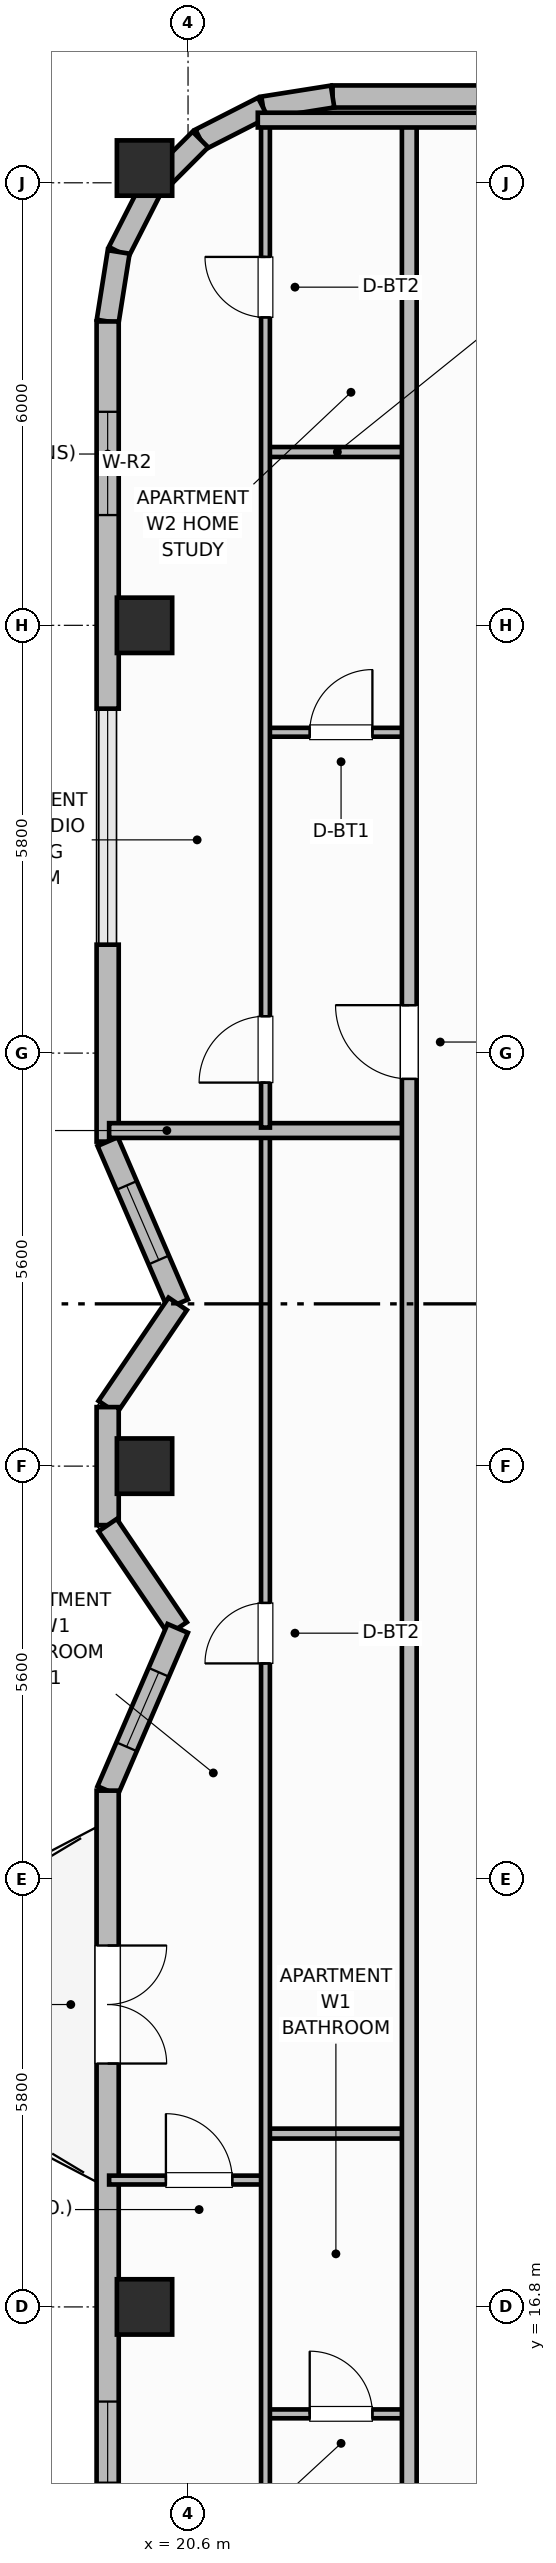
"""IFC4 building model, lengths in metres.
Left out: names, types, materials, properties, quantities, classifications, styles, units other than length and angle.
Written with IfcOpenShell. Run it as: python <this file> out.ifc"""

import sys

from ifc_helpers import new_model, si_unit, direction, frame, frame_2d, origin, origin_2d, place, context, subcontext, project, spatial, rectangle, extrude, element, fill, save


model = new_model("IFC4")
c1 = context("Model", 3, precision=1e-05, world=origin(), true_north=direction((0.0, 1.0)))
c2 = subcontext(c1, "Body", "Model", "MODEL_VIEW")
j1 = project(units=[si_unit("LENGTHUNIT", "METRE"), si_unit("PLANEANGLEUNIT", "RADIAN")], contexts=[c1])
p1 = place(None, origin())
s1 = spatial("IfcSite", under=j1, at=p1, CompositionType="ELEMENT")
p2 = place(p1, origin())
s2 = spatial("IfcBuilding", under=s1, at=p2, CompositionType="ELEMENT")
p3 = place(p2, frame((0.0, 0.0, 289.8)))
s3 = spatial("IfcBuildingStorey", under=s2, at=p3, CompositionType="ELEMENT", Elevation=289.8)
for number, where, z_axis, x_axis in (
    (1, (20.01, 16.8, 0.0), (0.0, 0.0, 1.0), (1.0, 0.0, 0.0)),
    (2, (20.01, 28.2, 0.0), (0.0, 0.0, 1.0), (1.0, 0.0, 0.0)),
    (3, (20.01, 39.6, 0.0), (0.0, 0.0, 1.0), (1.0, 0.0, 0.0)),
    (4, (20.01, 45.8, 0.0), (0.0, 0.0, 1.0), (1.0, 0.0, 0.0)),
):
    element("IfcColumn", number, at=place(p3, frame(where, z_axis=z_axis, x_axis=x_axis)), inside=s3, PredefinedType="COLUMN", context=c2, shape_type="SweptSolid", body=[
        extrude(rectangle(XDim=0.75, YDim=0.75, at=origin_2d()), origin(), (0.0, 0.0, 1.0), 3.7),
    ])
p4 = place(p3, frame((48.19, 46.77, 0.0), z_axis=(0.0, 0.0, 1.0), x_axis=(-1.0, 0.0, 0.0)))
e5 = element("IfcWall", 5, at=p4, inside=s3, PredefinedType="SOLIDWALL", context=c2, shape_type="SweptSolid", body=[
    extrude(rectangle(XDim=25.63, YDim=0.3, at=frame_2d((12.815, 0.0))), origin(), (0.0, 0.0, 1.0), 2.73),
])
p5 = place(p4, frame((1.371, 0.0, 0.71)))
e6 = element("IfcOpeningElement", 6, at=p5, cuts=e5, PredefinedType="OPENING", context=c2, shape_type="SweptSolid", body=[
    extrude(rectangle(XDim=1.6, YDim=1.9, at=frame_2d((0.8, 0.95))), frame((0.0, 0.16, 0.0), z_axis=(0.0, -1.0, 0.0), x_axis=(1.0, 0.0, 0.0)), (0.0, 0.0, 1.0), 0.32),
])
p6 = place(p4, frame((7.453, 0.0, 0.71)))
e7 = element("IfcOpeningElement", 7, at=p6, cuts=e5, PredefinedType="OPENING", context=c2, shape_type="SweptSolid", body=[
    extrude(rectangle(XDim=1.6, YDim=1.9, at=frame_2d((0.8, 0.95))), frame((0.0, 0.16, 0.0), z_axis=(0.0, -1.0, 0.0), x_axis=(1.0, 0.0, 0.0)), (0.0, 0.0, 1.0), 0.32),
])
p7 = place(p4, frame((10.144, 0.0, 0.71)))
e8 = element("IfcOpeningElement", 8, at=p7, cuts=e5, PredefinedType="OPENING", context=c2, shape_type="SweptSolid", body=[
    extrude(rectangle(XDim=1.6, YDim=1.9, at=frame_2d((0.8, 0.95))), frame((0.0, 0.16, 0.0), z_axis=(0.0, -1.0, 0.0), x_axis=(1.0, 0.0, 0.0)), (0.0, 0.0, 1.0), 0.32),
])
p8 = place(p4, frame((14.586, 0.0, 0.71)))
e9 = element("IfcOpeningElement", 9, at=p8, cuts=e5, PredefinedType="OPENING", context=c2, shape_type="SweptSolid", body=[
    extrude(rectangle(XDim=1.6, YDim=1.9, at=frame_2d((0.8, 0.95))), frame((0.0, 0.16, 0.0), z_axis=(0.0, -1.0, 0.0), x_axis=(1.0, 0.0, 0.0)), (0.0, 0.0, 1.0), 0.32),
])
p9 = place(p4, frame((16.927, 0.0, 0.71)))
e10 = element("IfcOpeningElement", 10, at=p9, cuts=e5, PredefinedType="OPENING", context=c2, shape_type="SweptSolid", body=[
    extrude(rectangle(XDim=1.6, YDim=1.9, at=frame_2d((0.8, 0.95))), frame((0.0, 0.16, 0.0), z_axis=(0.0, -1.0, 0.0), x_axis=(1.0, 0.0, 0.0)), (0.0, 0.0, 1.0), 0.32),
])
p10 = place(p4, frame((19.618, 0.0, 0.71)))
e11 = element("IfcOpeningElement", 11, at=p10, cuts=e5, PredefinedType="OPENING", context=c2, shape_type="SweptSolid", body=[
    extrude(rectangle(XDim=1.6, YDim=1.9, at=frame_2d((0.8, 0.95))), frame((0.0, 0.16, 0.0), z_axis=(0.0, -1.0, 0.0), x_axis=(1.0, 0.0, 0.0)), (0.0, 0.0, 1.0), 0.32),
])
p11 = place(p3, frame((22.56, 46.77, 0.0), z_axis=(0.0, 0.0, 1.0), x_axis=(-0.987669453596, -0.156553666304, 0.0)))
e12 = element("IfcWall", 12, at=p11, inside=s3, PredefinedType="SOLIDWALL", context=c2, shape_type="SweptSolid", body=[
    extrude(rectangle(XDim=0.954, YDim=0.3, at=frame_2d((0.477, 0.0))), origin(), (0.0, 0.0, 1.0), 2.73),
])
p12 = place(p3, frame((21.617, 46.621, 0.0), z_axis=(0.0, 0.0, 1.0), x_axis=(-0.891023873617, -0.45395644796, 0.0)))
e13 = element("IfcWall", 13, at=p12, inside=s3, PredefinedType="SOLIDWALL", context=c2, shape_type="SweptSolid", body=[
    extrude(rectangle(XDim=0.954, YDim=0.3, at=frame_2d((0.477, 0.0))), origin(), (0.0, 0.0, 1.0), 2.73),
])
p13 = place(p3, frame((20.767, 46.188, 0.0), z_axis=(0.0, 0.0, 1.0), x_axis=(-0.707106781187, -0.707106781187, 0.0)))
e14 = element("IfcWall", 14, at=p13, inside=s3, PredefinedType="SOLIDWALL", context=c2, shape_type="SweptSolid", body=[
    extrude(rectangle(XDim=0.954, YDim=0.3, at=frame_2d((0.477, 0.0))), origin(), (0.0, 0.0, 1.0), 2.73),
])
p14 = place(p3, frame((20.093, 45.513, 0.0), z_axis=(0.0, 0.0, 1.0), x_axis=(-0.454159573051, -0.890920356825, 0.0)))
e15 = element("IfcWall", 15, at=p14, inside=s3, PredefinedType="SOLIDWALL", context=c2, shape_type="SweptSolid", body=[
    extrude(rectangle(XDim=0.954, YDim=0.3, at=frame_2d((0.477, 0.0))), origin(), (0.0, 0.0, 1.0), 2.73),
])
p15 = place(p3, frame((19.659, 44.663, 0.0), z_axis=(0.0, 0.0, 1.0), x_axis=(-0.156304114255, -0.987708977314, 0.0)))
e16 = element("IfcWall", 16, at=p15, inside=s3, PredefinedType="SOLIDWALL", context=c2, shape_type="SweptSolid", body=[
    extrude(rectangle(XDim=0.954, YDim=0.3, at=frame_2d((0.477, 0.0))), origin(), (0.0, 0.0, 1.0), 2.73),
])
p16 = place(p3, frame((19.51, 43.72, 0.0), z_axis=(0.0, 0.0, 1.0), x_axis=(0.0, -1.0, 0.0)))
e17 = element("IfcWall", 17, at=p16, inside=s3, PredefinedType="SOLIDWALL", context=c2, shape_type="SweptSolid", body=[
    extrude(rectangle(XDim=5.25, YDim=0.3, at=frame_2d((2.625, 0.0))), origin(), (0.0, 0.0, 1.0), 2.73),
])
p17 = place(p16, frame((1.225, 0.0, 0.76)))
e18 = element("IfcOpeningElement", 18, at=p17, cuts=e17, PredefinedType="OPENING", context=c2, shape_type="SweptSolid", body=[
    extrude(rectangle(XDim=1.4, YDim=1.85, at=frame_2d((0.7, 0.925))), frame((0.0, 0.16, 0.0), z_axis=(0.0, -1.0, 0.0), x_axis=(1.0, 0.0, 0.0)), (0.0, 0.0, 1.0), 0.32),
])
p18 = place(p3, frame((19.51, 35.27, 0.0), z_axis=(0.0, 0.0, 1.0), x_axis=(0.0, -1.0, 0.0)))
e19 = element("IfcWall", 19, at=p18, inside=s3, PredefinedType="SOLIDWALL", context=c2, shape_type="SweptSolid", body=[
    extrude(rectangle(XDim=2.67, YDim=0.3, at=frame_2d((1.335, 0.0))), origin(), (0.0, 0.0, 1.0), 2.73),
])
p19 = place(p3, frame((19.51, 32.6, 0.0), z_axis=(0.0, 0.0, 1.0), x_axis=(0.396389181543, -0.918082576218, 0.0)))
e20 = element("IfcWall", 20, at=p19, inside=s3, PredefinedType="SOLIDWALL", context=c2, shape_type="SweptSolid", body=[
    extrude(rectangle(XDim=2.396, YDim=0.3, at=frame_2d((1.198, 0.0))), origin(), (0.0, 0.0, 1.0), 2.73),
])
p20 = place(p19, frame((0.648, 0.0, 0.92)))
e21 = element("IfcOpeningElement", 21, at=p20, cuts=e20, PredefinedType="OPENING", context=c2, shape_type="SweptSolid", body=[
    extrude(rectangle(XDim=1.1, YDim=1.65, at=frame_2d((0.55, 0.825))), frame((0.0, 0.16, 0.0), z_axis=(0.0, -1.0, 0.0), x_axis=(1.0, 0.0, 0.0)), (0.0, 0.0, 1.0), 0.32),
])
p21 = place(p3, frame((20.46, 30.4, 0.0), z_axis=(0.0, 0.0, 1.0), x_axis=(-0.561508476251, -0.827470985049, 0.0)))
e22 = element("IfcWall", 22, at=p21, inside=s3, PredefinedType="SOLIDWALL", context=c2, shape_type="SweptSolid", body=[
    extrude(rectangle(XDim=1.692, YDim=0.3, at=frame_2d((0.846, 0.0))), origin(), (0.0, 0.0, 1.0), 2.73),
])
p22 = place(p3, frame((19.51, 29.0, 0.0), z_axis=(0.0, 0.0, 1.0), x_axis=(0.0, -1.0, 0.0)))
e23 = element("IfcWall", 23, at=p22, inside=s3, PredefinedType="SOLIDWALL", context=c2, shape_type="SweptSolid", body=[
    extrude(rectangle(XDim=1.6, YDim=0.3, at=frame_2d((0.8, 0.0))), origin(), (0.0, 0.0, 1.0), 2.73),
])
p23 = place(p3, frame((19.51, 27.4, 0.0), z_axis=(0.0, 0.0, 1.0), x_axis=(0.561508476251, -0.827470985049, 0.0)))
e24 = element("IfcWall", 24, at=p23, inside=s3, PredefinedType="SOLIDWALL", context=c2, shape_type="SweptSolid", body=[
    extrude(rectangle(XDim=1.692, YDim=0.3, at=frame_2d((0.846, 0.0))), origin(), (0.0, 0.0, 1.0), 2.73),
])
p24 = place(p3, frame((20.46, 26.0, 0.0), z_axis=(0.0, 0.0, 1.0), x_axis=(-0.396426258231, -0.918066567186, 0.0)))
e25 = element("IfcWall", 25, at=p24, inside=s3, PredefinedType="SOLIDWALL", context=c2, shape_type="SweptSolid", body=[
    extrude(rectangle(XDim=2.396, YDim=0.3, at=frame_2d((1.198, 0.0))), origin(), (0.0, 0.0, 1.0), 2.73),
])
p25 = place(p24, frame((0.648, 0.0, 0.92)))
e26 = element("IfcOpeningElement", 26, at=p25, cuts=e25, PredefinedType="OPENING", context=c2, shape_type="SweptSolid", body=[
    extrude(rectangle(XDim=1.1, YDim=1.65, at=frame_2d((0.55, 0.825))), frame((0.0, 0.16, 0.0), z_axis=(0.0, -1.0, 0.0), x_axis=(1.0, 0.0, 0.0)), (0.0, 0.0, 1.0), 0.32),
])
p26 = place(p3, frame((19.51, 23.8, 0.0), z_axis=(0.0, 0.0, 1.0), x_axis=(0.0, -1.0, 0.0)))
e27 = element("IfcWall", 27, at=p26, inside=s3, PredefinedType="SOLIDWALL", context=c2, shape_type="SweptSolid", body=[
    extrude(rectangle(XDim=11.12, YDim=0.3, at=frame_2d((5.56, 0.0))), origin(), (0.0, 0.0, 1.0), 2.73),
])
p27 = place(p26, frame((2.1, 0.0, 0.0)))
e28 = element("IfcOpeningElement", 28, at=p27, cuts=e27, PredefinedType="OPENING", context=c2, shape_type="SweptSolid", body=[
    extrude(rectangle(XDim=1.6, YDim=2.1, at=frame_2d((0.8, 1.05))), frame((0.0, 0.16, 0.0), z_axis=(0.0, -1.0, 0.0), x_axis=(1.0, 0.0, 0.0)), (0.0, 0.0, 1.0), 0.32),
])
p28 = place(p26, frame((8.283, 0.0, 0.95)))
e29 = element("IfcOpeningElement", 29, at=p28, cuts=e27, PredefinedType="OPENING", context=c2, shape_type="SweptSolid", body=[
    extrude(rectangle(XDim=1.1, YDim=1.65, at=frame_2d((0.55, 0.825))), frame((0.0, 0.16, 0.0), z_axis=(0.0, -1.0, 0.0), x_axis=(1.0, 0.0, 0.0)), (0.0, 0.0, 1.0), 0.32),
])
p29 = place(p3, frame((21.65, 15.35, 0.0), z_axis=(0.0, 0.0, 1.0), x_axis=(1.0, 0.0, 0.0)))
e30 = element("IfcWall", 30, at=p29, inside=s3, PredefinedType="PARTITIONING", context=c2, shape_type="SweptSolid", body=[
    extrude(rectangle(XDim=1.95, YDim=0.12, at=frame_2d((0.975, 0.0))), origin(), (0.0, 0.0, 1.0), 2.56),
])
p30 = place(p29, frame((0.6, 0.0, 0.0)))
e31 = element("IfcOpeningElement", 31, at=p30, cuts=e30, PredefinedType="OPENING", context=c2, shape_type="SweptSolid", body=[
    extrude(rectangle(XDim=0.85, YDim=2.1, at=frame_2d((0.425, 1.05))), frame((0.0, 0.07, 0.0), z_axis=(0.0, -1.0, 0.0), x_axis=(1.0, 0.0, 0.0)), (0.0, 0.0, 1.0), 0.14),
])
p31 = place(p3, frame((21.65, 19.15, 0.0), z_axis=(0.0, 0.0, 1.0), x_axis=(1.0, 0.0, 0.0)))
e32 = element("IfcWall", 32, at=p31, inside=s3, PredefinedType="PARTITIONING", context=c2, shape_type="SweptSolid", body=[
    extrude(rectangle(XDim=1.95, YDim=0.135, at=frame_2d((0.975, 0.0))), origin(), (0.0, 0.0, 1.0), 2.56),
])
p32 = place(p3, frame((19.53, 18.52, 0.0), z_axis=(0.0, 0.0, 1.0), x_axis=(1.0, 0.0, 0.0)))
e33 = element("IfcWall", 33, at=p32, inside=s3, PredefinedType="PARTITIONING", context=c2, shape_type="SweptSolid", body=[
    extrude(rectangle(XDim=2.12, YDim=0.12, at=frame_2d((1.06, 0.0))), origin(), (0.0, 0.0, 1.0), 2.56),
])
p33 = place(p32, frame((0.77, 0.0, 0.0)))
e34 = element("IfcOpeningElement", 34, at=p33, cuts=e33, PredefinedType="OPENING", context=c2, shape_type="SweptSolid", body=[
    extrude(rectangle(XDim=0.9, YDim=2.1, at=frame_2d((0.45, 1.05))), frame((0.0, 0.07, 0.0), z_axis=(0.0, -1.0, 0.0), x_axis=(1.0, 0.0, 0.0)), (0.0, 0.0, 1.0), 0.14),
])
p34 = place(p3, frame((21.65, 9.99, 0.0), z_axis=(0.0, 0.0, 1.0), x_axis=(0.0, 1.0, 0.0)))
e35 = element("IfcWall", 35, at=p34, inside=s3, PredefinedType="PARTITIONING", context=c2, shape_type="SweptSolid", body=[
    extrude(rectangle(XDim=22.72, YDim=0.12, at=frame_2d((11.36, 0.0))), origin(), (0.0, 0.0, 1.0), 2.56),
])
p35 = place(p34, frame((0.41, 0.0, 0.0)))
e36 = element("IfcOpeningElement", 36, at=p35, cuts=e35, PredefinedType="OPENING", context=c2, shape_type="SweptSolid", body=[
    extrude(rectangle(XDim=0.9, YDim=2.1, at=frame_2d((0.45, 1.05))), frame((0.0, 0.07, 0.0), z_axis=(0.0, -1.0, 0.0), x_axis=(1.0, 0.0, 0.0)), (0.0, 0.0, 1.0), 0.14),
])
p36 = place(p34, frame((15.535, 0.0, 0.0)))
e37 = element("IfcOpeningElement", 37, at=p36, cuts=e35, PredefinedType="OPENING", context=c2, shape_type="SweptSolid", body=[
    extrude(rectangle(XDim=0.82, YDim=2.08, at=frame_2d((0.41, 1.04))), frame((0.0, 0.07, 0.0), z_axis=(0.0, -1.0, 0.0), x_axis=(1.0, 0.0, 0.0)), (0.0, 0.0, 1.0), 0.14),
])
p37 = place(p3, frame((19.53, 32.75, 0.0), z_axis=(0.0, 0.0, 1.0), x_axis=(1.0, 0.0, 0.0)))
e38 = element("IfcWall", 38, at=p37, inside=s3, PredefinedType="PARTITIONING", context=c2, shape_type="SweptSolid", body=[
    extrude(rectangle(XDim=4.07, YDim=0.2, at=frame_2d((2.035, 0.0))), origin(), (0.0, 0.0, 1.0), 2.56),
])
p38 = place(p3, frame((21.65, 38.15, 0.0), z_axis=(0.0, 0.0, 1.0), x_axis=(1.0, 0.0, 0.0)))
e39 = element("IfcWall", 39, at=p38, inside=s3, PredefinedType="PARTITIONING", context=c2, shape_type="SweptSolid", body=[
    extrude(rectangle(XDim=1.95, YDim=0.12, at=frame_2d((0.975, 0.0))), origin(), (0.0, 0.0, 1.0), 2.56),
])
p39 = place(p38, frame((0.6, 0.0, 0.0)))
e40 = element("IfcOpeningElement", 40, at=p39, cuts=e39, PredefinedType="OPENING", context=c2, shape_type="SweptSolid", body=[
    extrude(rectangle(XDim=0.85, YDim=2.1, at=frame_2d((0.425, 1.05))), frame((0.0, 0.07, 0.0), z_axis=(0.0, -1.0, 0.0), x_axis=(1.0, 0.0, 0.0)), (0.0, 0.0, 1.0), 0.14),
])
p40 = place(p3, frame((21.65, 41.95, 0.0), z_axis=(0.0, 0.0, 1.0), x_axis=(1.0, 0.0, 0.0)))
e41 = element("IfcWall", 41, at=p40, inside=s3, PredefinedType="PARTITIONING", context=c2, shape_type="SweptSolid", body=[
    extrude(rectangle(XDim=1.95, YDim=0.135, at=frame_2d((0.975, 0.0))), origin(), (0.0, 0.0, 1.0), 2.56),
])
p41 = place(p3, frame((21.65, 32.79, 0.0), z_axis=(0.0, 0.0, 1.0), x_axis=(0.0, 1.0, 0.0)))
e42 = element("IfcWall", 42, at=p41, inside=s3, PredefinedType="PARTITIONING", context=c2, shape_type="SweptSolid", body=[
    extrude(rectangle(XDim=13.62, YDim=0.12, at=frame_2d((6.81, 0.0))), origin(), (0.0, 0.0, 1.0), 2.56),
])
p42 = place(p41, frame((0.61, 0.0, 0.0)))
e43 = element("IfcOpeningElement", 43, at=p42, cuts=e42, PredefinedType="OPENING", context=c2, shape_type="SweptSolid", body=[
    extrude(rectangle(XDim=0.9, YDim=2.1, at=frame_2d((0.45, 1.05))), frame((0.0, 0.07, 0.0), z_axis=(0.0, -1.0, 0.0), x_axis=(1.0, 0.0, 0.0)), (0.0, 0.0, 1.0), 0.14),
])
p43 = place(p41, frame((10.985, 0.0, 0.0)))
e44 = element("IfcOpeningElement", 44, at=p43, cuts=e42, PredefinedType="OPENING", context=c2, shape_type="SweptSolid", body=[
    extrude(rectangle(XDim=0.82, YDim=2.08, at=frame_2d((0.41, 1.04))), frame((0.0, 0.07, 0.0), z_axis=(0.0, -1.0, 0.0), x_axis=(1.0, 0.0, 0.0)), (0.0, 0.0, 1.0), 0.14),
])
p44 = place(p3, frame((23.6, 9.95, 0.0), z_axis=(0.0, 0.0, 1.0), x_axis=(0.0, 1.0, 0.0)))
e45 = element("IfcWall", 45, at=p44, inside=s3, PredefinedType="PARTITIONING", context=c2, shape_type="SweptSolid", body=[
    extrude(rectangle(XDim=36.5, YDim=0.2, at=frame_2d((18.25, 0.0))), origin(), (0.0, 0.0, 1.0), 2.56),
])
p45 = place(p44, frame((3.25, 0.0, 0.0)))
e46 = element("IfcOpeningElement", 46, at=p45, cuts=e45, PredefinedType="OPENING", context=c2, shape_type="SweptSolid", body=[
    extrude(rectangle(XDim=1.0, YDim=2.15, at=frame_2d((0.5, 1.075))), frame((0.0, 0.11, 0.0), z_axis=(0.0, -1.0, 0.0), x_axis=(1.0, 0.0, 0.0)), (0.0, 0.0, 1.0), 0.22),
])
p46 = place(p44, frame((23.5, 0.0, 0.0)))
e47 = element("IfcOpeningElement", 47, at=p46, cuts=e45, PredefinedType="OPENING", context=c2, shape_type="SweptSolid", body=[
    extrude(rectangle(XDim=1.0, YDim=2.15, at=frame_2d((0.5, 1.075))), frame((0.0, 0.11, 0.0), z_axis=(0.0, -1.0, 0.0), x_axis=(1.0, 0.0, 0.0)), (0.0, 0.0, 1.0), 0.22),
])
p47 = place(p3, frame((21.546, 46.45, 0.0), z_axis=(0.0, 0.0, 1.0), x_axis=(1.0, 0.0, 0.0)))
e48 = element("IfcWall", 48, at=p47, inside=s3, PredefinedType="PARTITIONING", context=c2, shape_type="SweptSolid", body=[
    extrude(rectangle(XDim=3.754, YDim=0.2, at=frame_2d((1.877, 0.0))), origin(), (0.0, 0.0, 1.0), 2.56),
])
p48 = place(p17, origin())
e49 = element("IfcWindow", 49, at=p48, inside=s3, PartitioningType="SINGLE_PANEL", PredefinedType="WINDOW", context=c2, shape_type="SweptSolid", body=[
    extrude(rectangle(XDim=1.4, YDim=1.85, at=frame_2d((0.7, 0.925))), frame((0.0, 0.03, 0.0), z_axis=(0.0, -1.0, 0.0), x_axis=(1.0, 0.0, 0.0)), (0.0, 0.0, 1.0), 0.06),
])
fill(e18, e49)
p49 = place(p20, origin())
e50 = element("IfcWindow", 50, at=p49, inside=s3, PartitioningType="SINGLE_PANEL", PredefinedType="WINDOW", context=c2, shape_type="SweptSolid", body=[
    extrude(rectangle(XDim=1.1, YDim=1.65, at=frame_2d((0.55, 0.825))), frame((0.0, 0.03, 0.0), z_axis=(0.0, -1.0, 0.0), x_axis=(1.0, 0.0, 0.0)), (0.0, 0.0, 1.0), 0.06),
])
fill(e21, e50)
p50 = place(p25, origin())
e51 = element("IfcWindow", 51, at=p50, inside=s3, PartitioningType="SINGLE_PANEL", PredefinedType="WINDOW", context=c2, shape_type="SweptSolid", body=[
    extrude(rectangle(XDim=1.1, YDim=1.65, at=frame_2d((0.55, 0.825))), frame((0.0, 0.03, 0.0), z_axis=(0.0, -1.0, 0.0), x_axis=(1.0, 0.0, 0.0)), (0.0, 0.0, 1.0), 0.06),
])
fill(e26, e51)
p51 = place(p27, origin())
e52 = element("IfcDoor", 52, at=p51, inside=s3, OperationType="DOUBLE_DOOR_SINGLE_SWING", PredefinedType="DOOR", context=c2, shape_type="SweptSolid", body=[
    extrude(rectangle(XDim=1.6, YDim=2.1, at=frame_2d((0.8, 1.05))), frame((0.0, 0.025, 0.0), z_axis=(0.0, -1.0, 0.0), x_axis=(1.0, 0.0, 0.0)), (0.0, 0.0, 1.0), 0.05),
])
fill(e28, e52)
p52 = place(p28, origin())
e53 = element("IfcWindow", 53, at=p52, inside=s3, PartitioningType="SINGLE_PANEL", PredefinedType="WINDOW", context=c2, shape_type="SweptSolid", body=[
    extrude(rectangle(XDim=1.1, YDim=1.65, at=frame_2d((0.55, 0.825))), frame((0.0, 0.03, 0.0), z_axis=(0.0, -1.0, 0.0), x_axis=(1.0, 0.0, 0.0)), (0.0, 0.0, 1.0), 0.06),
])
fill(e29, e53)
p53 = place(p30, origin())
e54 = element("IfcDoor", 54, at=p53, inside=s3, OperationType="SINGLE_SWING_LEFT", PredefinedType="DOOR", context=c2, shape_type="SweptSolid", body=[
    extrude(rectangle(XDim=0.85, YDim=2.1, at=frame_2d((0.425, 1.05))), frame((0.0, 0.025, 0.0), z_axis=(0.0, -1.0, 0.0), x_axis=(1.0, 0.0, 0.0)), (0.0, 0.0, 1.0), 0.05),
])
fill(e31, e54)
p54 = place(p33, origin())
e55 = element("IfcDoor", 55, at=p54, inside=s3, OperationType="SINGLE_SWING_LEFT", PredefinedType="DOOR", context=c2, shape_type="SweptSolid", body=[
    extrude(rectangle(XDim=0.9, YDim=2.1, at=frame_2d((0.45, 1.05))), frame((0.0, 0.025, 0.0), z_axis=(0.0, -1.0, 0.0), x_axis=(1.0, 0.0, 0.0)), (0.0, 0.0, 1.0), 0.05),
])
fill(e34, e55)
p55 = place(p36, origin())
e56 = element("IfcDoor", 56, at=p55, inside=s3, OperationType="SINGLE_SWING_LEFT", PredefinedType="DOOR", context=c2, shape_type="SweptSolid", body=[
    extrude(rectangle(XDim=0.82, YDim=2.08, at=frame_2d((0.41, 1.04))), frame((0.0, 0.025, 0.0), z_axis=(0.0, -1.0, 0.0), x_axis=(1.0, 0.0, 0.0)), (0.0, 0.0, 1.0), 0.05),
])
fill(e37, e56)
p56 = place(p39, origin())
e57 = element("IfcDoor", 57, at=p56, inside=s3, OperationType="SINGLE_SWING_RIGHT", PredefinedType="DOOR", context=c2, shape_type="SweptSolid", body=[
    extrude(rectangle(XDim=0.85, YDim=2.1, at=frame_2d((0.425, 1.05))), frame((0.0, 0.025, 0.0), z_axis=(0.0, -1.0, 0.0), x_axis=(1.0, 0.0, 0.0)), (0.0, 0.0, 1.0), 0.05),
])
fill(e40, e57)
p57 = place(p42, origin())
e58 = element("IfcDoor", 58, at=p57, inside=s3, OperationType="SINGLE_SWING_LEFT", PredefinedType="DOOR", context=c2, shape_type="SweptSolid", body=[
    extrude(rectangle(XDim=0.9, YDim=2.1, at=frame_2d((0.45, 1.05))), frame((0.0, 0.025, 0.0), z_axis=(0.0, -1.0, 0.0), x_axis=(1.0, 0.0, 0.0)), (0.0, 0.0, 1.0), 0.05),
])
fill(e43, e58)
p58 = place(p43, origin())
e59 = element("IfcDoor", 59, at=p58, inside=s3, OperationType="SINGLE_SWING_RIGHT", PredefinedType="DOOR", context=c2, shape_type="SweptSolid", body=[
    extrude(rectangle(XDim=0.82, YDim=2.08, at=frame_2d((0.41, 1.04))), frame((0.0, 0.025, 0.0), z_axis=(0.0, -1.0, 0.0), x_axis=(1.0, 0.0, 0.0)), (0.0, 0.0, 1.0), 0.05),
])
fill(e44, e59)
p59 = place(p46, origin())
e60 = element("IfcDoor", 60, at=p59, inside=s3, OperationType="SINGLE_SWING_RIGHT", PredefinedType="DOOR", context=c2, shape_type="SweptSolid", body=[
    extrude(rectangle(XDim=1.0, YDim=2.15, at=frame_2d((0.5, 1.075))), frame((0.0, 0.025, 0.0), z_axis=(0.0, -1.0, 0.0), x_axis=(1.0, 0.0, 0.0)), (0.0, 0.0, 1.0), 0.05),
])
fill(e47, e60)
save(model, sys.argv[1])
